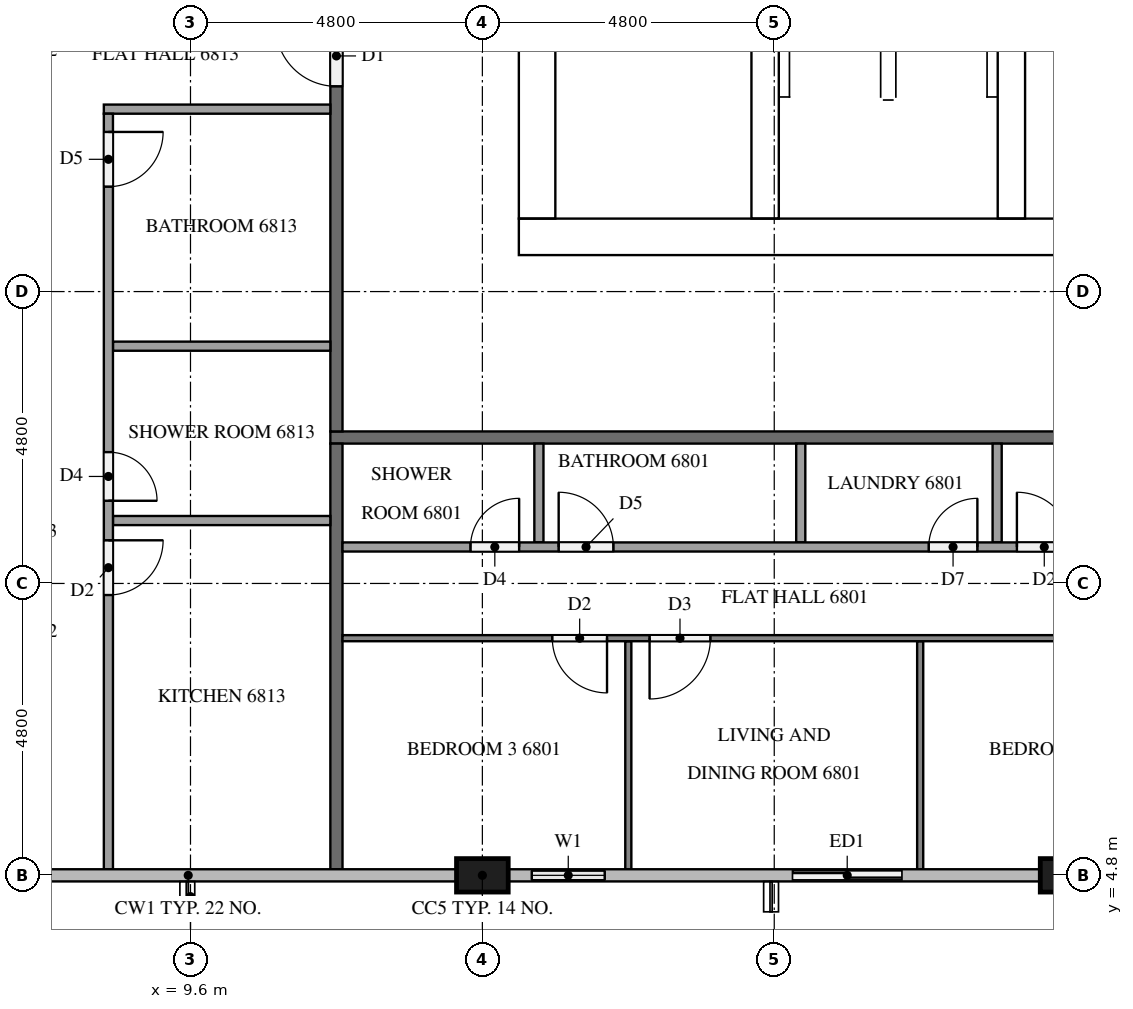
"""IFC4 building model, lengths in metres.
Left out: names, types, materials, properties, quantities, classifications, styles, units other than length and angle.
Written with IfcOpenShell. Run it as: python <this file> out.ifc"""

import sys

from ifc_helpers import new_model, si_unit, direction, frame, frame_2d, origin, origin_2d, place, context, subcontext, project, spatial, rectangle, extrude, element, fill, save


model = new_model("IFC4")
c1 = context("Model", 3, precision=1e-05, world=origin(), true_north=direction((0.0, 1.0)))
c2 = subcontext(c1, "Body", "Model", "MODEL_VIEW")
j1 = project(units=[si_unit("LENGTHUNIT", "METRE"), si_unit("PLANEANGLEUNIT", "RADIAN")], contexts=[c1])
p1 = place(None, origin())
s1 = spatial("IfcSite", under=j1, at=p1, CompositionType="ELEMENT")
p2 = place(p1, origin())
s2 = spatial("IfcBuilding", under=s1, at=p2, CompositionType="ELEMENT")
p3 = place(p2, frame((0.0, 0.0, 259.7)))
s3 = spatial("IfcBuildingStorey", under=s2, at=p3, CompositionType="ELEMENT", Elevation=259.7)
p4 = place(p3, frame((15.0, 15.3, 0.0), z_axis=(0.0, 0.0, 1.0), x_axis=(1.0, 0.0, 0.0)))
e1 = element("IfcWall", 1, at=p4, inside=s3, PredefinedType="SHEAR", context=c2, shape_type="SweptSolid", body=[
    extrude(rectangle(XDim=32.4, YDim=0.6, at=frame_2d((16.2, 0.0))), origin(), (0.0, 0.0, 1.0), 3.1),
])
p5 = place(p4, frame((15.3, 0.0, 0.0)))
e2 = element("IfcOpeningElement", 2, at=p5, cuts=e1, PredefinedType="OPENING", context=c2, shape_type="SweptSolid", body=[
    extrude(rectangle(XDim=1.8, YDim=2.1, at=frame_2d((0.9, 1.05))), frame((0.0, 0.31, 0.0), z_axis=(0.0, -1.0, 0.0), x_axis=(1.0, 0.0, 0.0)), (0.0, 0.0, 1.0), 0.62),
])
p6 = place(p3, frame((15.3, 15.6, 0.0), z_axis=(0.0, 0.0, 1.0), x_axis=(0.0, 1.0, 0.0)))
e3 = element("IfcWall", 3, at=p6, inside=s3, PredefinedType="SHEAR", context=c2, shape_type="SweptSolid", body=[
    extrude(rectangle(XDim=21.6, YDim=0.6, at=frame_2d((10.8, 0.0))), origin(), (0.0, 0.0, 1.0), 3.1),
])
p7 = place(p6, frame((5.16, 0.0, 0.0)))
e4 = element("IfcOpeningElement", 4, at=p7, cuts=e3, PredefinedType="OPENING", context=c2, shape_type="SweptSolid", body=[
    extrude(rectangle(XDim=1.2, YDim=2.1, at=frame_2d((0.6, 1.05))), frame((0.0, 0.31, 0.0), z_axis=(0.0, -1.0, 0.0), x_axis=(1.0, 0.0, 0.0)), (0.0, 0.0, 1.0), 0.62),
])
p8 = place(p3, frame((19.05, 15.6, 0.0), z_axis=(0.0, 0.0, 1.0), x_axis=(0.0, 1.0, 0.0)))
e5 = element("IfcWall", 5, at=p8, inside=s3, PredefinedType="SHEAR", context=c2, shape_type="SweptSolid", body=[
    extrude(rectangle(XDim=15.425, YDim=0.45, at=frame_2d((7.712, 0.0))), origin(), (0.0, 0.0, 1.0), 3.1),
])
p9 = place(p8, frame((9.85, 0.0, 0.0)))
e6 = element("IfcOpeningElement", 6, at=p9, cuts=e5, PredefinedType="OPENING", context=c2, shape_type="SweptSolid", body=[
    extrude(rectangle(XDim=1.1, YDim=2.1, at=frame_2d((0.55, 1.05))), frame((0.0, 0.235, 0.0), z_axis=(0.0, -1.0, 0.0), x_axis=(1.0, 0.0, 0.0)), (0.0, 0.0, 1.0), 0.47),
])
p10 = place(p8, frame((13.35, 0.0, 0.0)))
e7 = element("IfcOpeningElement", 7, at=p10, cuts=e5, PredefinedType="OPENING", context=c2, shape_type="SweptSolid", body=[
    extrude(rectangle(XDim=1.1, YDim=2.1, at=frame_2d((0.55, 1.05))), frame((0.0, 0.235, 0.0), z_axis=(0.0, -1.0, 0.0), x_axis=(1.0, 0.0, 0.0)), (0.0, 0.0, 1.0), 0.47),
])
p11 = place(p8, frame((0.6, 0.0, 0.0)))
e8 = element("IfcOpeningElement", 8, at=p11, cuts=e5, PredefinedType="OPENING", context=c2, shape_type="SweptSolid", body=[
    extrude(rectangle(XDim=1.2, YDim=2.1, at=frame_2d((0.6, 1.05))), frame((0.0, 0.235, 0.0), z_axis=(0.0, -1.0, 0.0), x_axis=(1.0, 0.0, 0.0)), (0.0, 0.0, 1.0), 0.47),
])
p12 = place(p3, frame((23.1, 15.6, 0.0), z_axis=(0.0, 0.0, 1.0), x_axis=(0.0, 1.0, 0.0)))
e9 = element("IfcWall", 9, at=p12, inside=s3, PredefinedType="SHEAR", context=c2, shape_type="SweptSolid", body=[
    extrude(rectangle(XDim=21.6, YDim=0.45, at=frame_2d((10.8, 0.0))), origin(), (0.0, 0.0, 1.0), 3.1),
])
for number, where, z_axis, x_axis in (
    (10, (14.4, 4.8, 0.0), (0.0, 0.0, 1.0), (1.0, 0.0, 0.0)),
    (11, (24.0, 4.8, 0.0), (0.0, 0.0, 1.0), (1.0, 0.0, 0.0)),
):
    element("IfcColumn", number, at=place(p3, frame(where, z_axis=z_axis, x_axis=x_axis)), inside=s3, PredefinedType="COLUMN", context=c2, shape_type="SweptSolid", body=[
        extrude(rectangle(XDim=0.85, YDim=0.55, at=origin_2d()), origin(), (0.0, 0.0, 1.0), 3.1),
    ])
p13 = place(p3, frame((14.825, 4.8, 0.0), z_axis=(0.0, 0.0, 1.0), x_axis=(1.0, 0.0, 0.0)))
e12 = element("IfcWall", 12, at=p13, inside=s3, PredefinedType="SOLIDWALL", context=c2, shape_type="SweptSolid", body=[
    extrude(rectangle(XDim=1.975, YDim=0.15, at=frame_2d((0.988, 0.0))), origin(), (0.0, 0.0, 1.0), 3.1),
])
p14 = place(p13, frame((0.387, 0.0, 0.9)))
e13 = element("IfcOpeningElement", 13, at=p14, cuts=e12, PredefinedType="OPENING", context=c2, shape_type="SweptSolid", body=[
    extrude(rectangle(XDim=1.2, YDim=1.4, at=frame_2d((0.6, 0.7))), frame((0.0, 0.085, 0.0), z_axis=(0.0, -1.0, 0.0), x_axis=(1.0, 0.0, 0.0)), (0.0, 0.0, 1.0), 0.17),
])
p15 = place(p3, frame((19.2, 4.8, 0.0), z_axis=(0.0, 0.0, 1.0), x_axis=(1.0, 0.0, 0.0)))
e14 = element("IfcWall", 14, at=p15, inside=s3, PredefinedType="SOLIDWALL", context=c2, shape_type="SweptSolid", body=[
    extrude(rectangle(XDim=2.4, YDim=0.15, at=frame_2d((1.2, 0.0))), origin(), (0.0, 0.0, 1.0), 3.1),
])
p16 = place(p15, frame((0.3, 0.0, 0.0)))
e15 = element("IfcOpeningElement", 15, at=p16, cuts=e14, PredefinedType="OPENING", context=c2, shape_type="SweptSolid", body=[
    extrude(rectangle(XDim=1.8, YDim=2.4, at=frame_2d((0.9, 1.2))), frame((0.0, 0.085, 0.0), z_axis=(0.0, -1.0, 0.0), x_axis=(1.0, 0.0, 0.0)), (0.0, 0.0, 1.0), 0.17),
])
p17 = place(p3, frame((50.5, 12.0, 0.0), z_axis=(0.0, 0.0, 1.0), x_axis=(-1.0, 0.0, 0.0)))
e16 = element("IfcWall", 16, at=p17, inside=s3, PredefinedType="PARTITIONING", context=c2, shape_type="SweptSolid", body=[
    extrude(rectangle(XDim=38.6, YDim=0.2, at=frame_2d((19.3, 0.0))), origin(), (0.0, 0.0, 1.0), 3.1),
])
p18 = place(p17, frame((19.675, 0.0, 0.0)))
e17 = element("IfcOpeningElement", 17, at=p18, cuts=e16, PredefinedType="OPENING", context=c2, shape_type="SweptSolid", body=[
    extrude(rectangle(XDim=1.1, YDim=2.1, at=frame_2d((0.55, 1.05))), frame((0.0, 0.11, 0.0), z_axis=(0.0, -1.0, 0.0), x_axis=(1.0, 0.0, 0.0)), (0.0, 0.0, 1.0), 0.22),
])
p19 = place(p17, frame((2.925, 0.0, 0.0)))
e18 = element("IfcOpeningElement", 18, at=p19, cuts=e16, PredefinedType="OPENING", context=c2, shape_type="SweptSolid", body=[
    extrude(rectangle(XDim=1.0, YDim=2.1, at=frame_2d((0.5, 1.05))), frame((0.0, 0.11, 0.0), z_axis=(0.0, -1.0, 0.0), x_axis=(1.0, 0.0, 0.0)), (0.0, 0.0, 1.0), 0.22),
])
p20 = place(p17, frame((1.075, 0.0, 0.0)))
e19 = element("IfcOpeningElement", 19, at=p20, cuts=e16, PredefinedType="OPENING", context=c2, shape_type="SweptSolid", body=[
    extrude(rectangle(XDim=1.0, YDim=2.1, at=frame_2d((0.5, 1.05))), frame((0.0, 0.11, 0.0), z_axis=(0.0, -1.0, 0.0), x_axis=(1.0, 0.0, 0.0)), (0.0, 0.0, 1.0), 0.22),
])
p21 = place(p3, frame((12.0, 12.1, 0.0), z_axis=(0.0, 0.0, 1.0), x_axis=(0.0, 1.0, 0.0)))
e20 = element("IfcWall", 20, at=p21, inside=s3, PredefinedType="PARTITIONING", context=c2, shape_type="SweptSolid", body=[
    extrude(rectangle(XDim=28.6, YDim=0.2, at=frame_2d((14.3, 0.0))), origin(), (0.0, 0.0, 1.0), 3.1),
])
p22 = place(p21, frame((21.875, 0.0, 0.0)))
e21 = element("IfcOpeningElement", 21, at=p22, cuts=e20, PredefinedType="OPENING", context=c2, shape_type="SweptSolid", body=[
    extrude(rectangle(XDim=1.1, YDim=2.1, at=frame_2d((0.55, 1.05))), frame((0.0, 0.11, 0.0), z_axis=(0.0, -1.0, 0.0), x_axis=(1.0, 0.0, 0.0)), (0.0, 0.0, 1.0), 0.22),
])
p23 = place(p21, frame((20.075, 0.0, 0.0)))
e22 = element("IfcOpeningElement", 22, at=p23, cuts=e20, PredefinedType="OPENING", context=c2, shape_type="SweptSolid", body=[
    extrude(rectangle(XDim=1.0, YDim=2.1, at=frame_2d((0.5, 1.05))), frame((0.0, 0.11, 0.0), z_axis=(0.0, -1.0, 0.0), x_axis=(1.0, 0.0, 0.0)), (0.0, 0.0, 1.0), 0.22),
])
p24 = place(p21, frame((5.675, 0.0, 0.0)))
e23 = element("IfcOpeningElement", 23, at=p24, cuts=e20, PredefinedType="OPENING", context=c2, shape_type="SweptSolid", body=[
    extrude(rectangle(XDim=1.0, YDim=2.1, at=frame_2d((0.5, 1.05))), frame((0.0, 0.11, 0.0), z_axis=(0.0, -1.0, 0.0), x_axis=(1.0, 0.0, 0.0)), (0.0, 0.0, 1.0), 0.22),
])
p25 = place(p3, frame((12.0, 4.9, 0.0), z_axis=(0.0, 0.0, 1.0), x_axis=(0.0, 1.0, 0.0)))
e24 = element("IfcWall", 24, at=p25, inside=s3, PredefinedType="PARTITIONING", context=c2, shape_type="SweptSolid", body=[
    extrude(rectangle(XDim=7.0, YDim=0.2, at=frame_2d((3.5, 0.0))), origin(), (0.0, 0.0, 1.0), 3.1),
])
for number, where, z_axis, x_axis in (
    (25, (21.6, 8.65, 0.0), (0.0, 0.0, 1.0), (0.0, -1.0, 0.0)),
    (26, (16.8, 8.65, 0.0), (0.0, 0.0, 1.0), (0.0, -1.0, 0.0)),
):
    element("IfcWall", number, at=place(p3, frame(where, z_axis=z_axis, x_axis=x_axis)), inside=s3, PredefinedType="PARTITIONING", context=c2, shape_type="SweptSolid", body=[
        extrude(rectangle(XDim=3.75, YDim=0.1, at=frame_2d((1.875, 0.0))), origin(), (0.0, 0.0, 1.0), 3.1),
    ])
p26 = place(p3, frame((31.1, 8.7, 0.0), z_axis=(0.0, 0.0, 1.0), x_axis=(-1.0, 0.0, 0.0)))
e27 = element("IfcWall", 27, at=p26, inside=s3, PredefinedType="PARTITIONING", context=c2, shape_type="SweptSolid", body=[
    extrude(rectangle(XDim=19.0, YDim=0.1, at=frame_2d((9.5, 0.0))), origin(), (0.0, 0.0, 1.0), 3.1),
])
p27 = place(p26, frame((3.45, 0.0, 0.0)))
e28 = element("IfcOpeningElement", 28, at=p27, cuts=e27, PredefinedType="OPENING", context=c2, shape_type="SweptSolid", body=[
    extrude(rectangle(XDim=0.9, YDim=2.1, at=frame_2d((0.45, 1.05))), frame((0.0, 0.06, 0.0), z_axis=(0.0, -1.0, 0.0), x_axis=(1.0, 0.0, 0.0)), (0.0, 0.0, 1.0), 0.12),
])
p28 = place(p26, frame((5.05, 0.0, 0.0)))
e29 = element("IfcOpeningElement", 29, at=p28, cuts=e27, PredefinedType="OPENING", context=c2, shape_type="SweptSolid", body=[
    extrude(rectangle(XDim=0.9, YDim=2.1, at=frame_2d((0.45, 1.05))), frame((0.0, 0.06, 0.0), z_axis=(0.0, -1.0, 0.0), x_axis=(1.0, 0.0, 0.0)), (0.0, 0.0, 1.0), 0.12),
])
p29 = place(p26, frame((12.95, 0.0, 0.0)))
e30 = element("IfcOpeningElement", 30, at=p29, cuts=e27, PredefinedType="OPENING", context=c2, shape_type="SweptSolid", body=[
    extrude(rectangle(XDim=1.0, YDim=2.1, at=frame_2d((0.5, 1.05))), frame((0.0, 0.06, 0.0), z_axis=(0.0, -1.0, 0.0), x_axis=(1.0, 0.0, 0.0)), (0.0, 0.0, 1.0), 0.12),
])
p30 = place(p26, frame((14.65, 0.0, 0.0)))
e31 = element("IfcOpeningElement", 31, at=p30, cuts=e27, PredefinedType="OPENING", context=c2, shape_type="SweptSolid", body=[
    extrude(rectangle(XDim=0.9, YDim=2.1, at=frame_2d((0.45, 1.05))), frame((0.0, 0.06, 0.0), z_axis=(0.0, -1.0, 0.0), x_axis=(1.0, 0.0, 0.0)), (0.0, 0.0, 1.0), 0.12),
])
for number, where, z_axis, x_axis in (
    (32, (22.865, 11.9, 0.0), (0.0, 0.0, 1.0), (0.0, -1.0, 0.0)),
    (33, (19.636, 11.9, 0.0), (0.0, 0.0, 1.0), (0.0, -1.0, 0.0)),
    (34, (15.33, 11.9, 0.0), (0.0, 0.0, 1.0), (0.0, -1.0, 0.0)),
):
    element("IfcWall", number, at=place(p3, frame(where, z_axis=z_axis, x_axis=x_axis)), inside=s3, PredefinedType="PARTITIONING", context=c2, shape_type="SweptSolid", body=[
        extrude(rectangle(XDim=1.625, YDim=0.15, at=frame_2d((0.812, 0.0))), origin(), (0.0, 0.0, 1.0), 3.1),
    ])
p31 = place(p3, frame((12.1, 10.2, 0.0), z_axis=(0.0, 0.0, 1.0), x_axis=(1.0, 0.0, 0.0)))
e35 = element("IfcWall", 35, at=p31, inside=s3, PredefinedType="PARTITIONING", context=c2, shape_type="SweptSolid", body=[
    extrude(rectangle(XDim=17.225, YDim=0.15, at=frame_2d((8.612, 0.0))), origin(), (0.0, 0.0, 1.0), 3.1),
])
p32 = place(p31, frame((11.091, 0.0, 0.0)))
e36 = element("IfcOpeningElement", 36, at=p32, cuts=e35, PredefinedType="OPENING", context=c2, shape_type="SweptSolid", body=[
    extrude(rectangle(XDim=0.9, YDim=2.1, at=frame_2d((0.45, 1.05))), frame((0.0, 0.085, 0.0), z_axis=(0.0, -1.0, 0.0), x_axis=(1.0, 0.0, 0.0)), (0.0, 0.0, 1.0), 0.17),
])
p33 = place(p31, frame((9.641, 0.0, 0.0)))
e37 = element("IfcOpeningElement", 37, at=p33, cuts=e35, PredefinedType="OPENING", context=c2, shape_type="SweptSolid", body=[
    extrude(rectangle(XDim=0.8, YDim=2.1, at=frame_2d((0.4, 1.05))), frame((0.0, 0.085, 0.0), z_axis=(0.0, -1.0, 0.0), x_axis=(1.0, 0.0, 0.0)), (0.0, 0.0, 1.0), 0.17),
])
p34 = place(p31, frame((3.555, 0.0, 0.0)))
e38 = element("IfcOpeningElement", 38, at=p34, cuts=e35, PredefinedType="OPENING", context=c2, shape_type="SweptSolid", body=[
    extrude(rectangle(XDim=0.9, YDim=2.1, at=frame_2d((0.45, 1.05))), frame((0.0, 0.085, 0.0), z_axis=(0.0, -1.0, 0.0), x_axis=(1.0, 0.0, 0.0)), (0.0, 0.0, 1.0), 0.17),
])
p35 = place(p31, frame((2.105, 0.0, 0.0)))
e39 = element("IfcOpeningElement", 39, at=p35, cuts=e35, PredefinedType="OPENING", context=c2, shape_type="SweptSolid", body=[
    extrude(rectangle(XDim=0.8, YDim=2.1, at=frame_2d((0.4, 1.05))), frame((0.0, 0.085, 0.0), z_axis=(0.0, -1.0, 0.0), x_axis=(1.0, 0.0, 0.0)), (0.0, 0.0, 1.0), 0.17),
])
for number, where, z_axis, x_axis in (
    (40, (11.9, 13.502, 0.0), (0.0, 0.0, 1.0), (-1.0, 0.0, 0.0)),
    (41, (11.9, 10.635, 0.0), (0.0, 0.0, 1.0), (-1.0, 0.0, 0.0)),
):
    element("IfcWall", number, at=place(p3, frame(where, z_axis=z_axis, x_axis=x_axis)), inside=s3, PredefinedType="PARTITIONING", context=c2, shape_type="SweptSolid", body=[
        extrude(rectangle(XDim=3.575, YDim=0.15, at=frame_2d((1.788, 0.0))), origin(), (0.0, 0.0, 1.0), 3.1),
    ])
p36 = place(p3, frame((11.9, 17.4, 0.0), z_axis=(0.0, 0.0, 1.0), x_axis=(-1.0, 0.0, 0.0)))
e42 = element("IfcWall", 42, at=p36, inside=s3, PredefinedType="PARTITIONING", context=c2, shape_type="SweptSolid", body=[
    extrude(rectangle(XDim=3.725, YDim=0.15, at=frame_2d((1.862, 0.0))), origin(), (0.0, 0.0, 1.0), 3.1),
])
p37 = place(p3, frame((8.25, 17.325, 0.0), z_axis=(0.0, 0.0, 1.0), x_axis=(0.0, -1.0, 0.0)))
e43 = element("IfcWall", 43, at=p37, inside=s3, PredefinedType="PARTITIONING", context=c2, shape_type="SweptSolid", body=[
    extrude(rectangle(XDim=12.425, YDim=0.15, at=frame_2d((6.212, 0.0))), origin(), (0.0, 0.0, 1.0), 3.1),
])
p38 = place(p37, frame((0.3, 0.0, 0.0)))
e44 = element("IfcOpeningElement", 44, at=p38, cuts=e43, PredefinedType="OPENING", context=c2, shape_type="SweptSolid", body=[
    extrude(rectangle(XDim=0.9, YDim=2.1, at=frame_2d((0.45, 1.05))), frame((0.0, 0.085, 0.0), z_axis=(0.0, -1.0, 0.0), x_axis=(1.0, 0.0, 0.0)), (0.0, 0.0, 1.0), 0.17),
])
p39 = place(p37, frame((5.565, 0.0, 0.0)))
e45 = element("IfcOpeningElement", 45, at=p39, cuts=e43, PredefinedType="OPENING", context=c2, shape_type="SweptSolid", body=[
    extrude(rectangle(XDim=0.8, YDim=2.1, at=frame_2d((0.4, 1.05))), frame((0.0, 0.085, 0.0), z_axis=(0.0, -1.0, 0.0), x_axis=(1.0, 0.0, 0.0)), (0.0, 0.0, 1.0), 0.17),
])
p40 = place(p37, frame((7.015, 0.0, 0.0)))
e46 = element("IfcOpeningElement", 46, at=p40, cuts=e43, PredefinedType="OPENING", context=c2, shape_type="SweptSolid", body=[
    extrude(rectangle(XDim=0.9, YDim=2.1, at=frame_2d((0.45, 1.05))), frame((0.0, 0.085, 0.0), z_axis=(0.0, -1.0, 0.0), x_axis=(1.0, 0.0, 0.0)), (0.0, 0.0, 1.0), 0.17),
])
p41 = place(p14, origin())
e47 = element("IfcWindow", 47, at=p41, inside=s3, PartitioningType="SINGLE_PANEL", PredefinedType="WINDOW", context=c2, shape_type="SweptSolid", body=[
    extrude(rectangle(XDim=1.2, YDim=1.4, at=frame_2d((0.6, 0.7))), frame((0.0, 0.03, 0.0), z_axis=(0.0, -1.0, 0.0), x_axis=(1.0, 0.0, 0.0)), (0.0, 0.0, 1.0), 0.06),
])
fill(e13, e47)
p42 = place(p16, origin())
e48 = element("IfcDoor", 48, at=p42, inside=s3, OperationType="SLIDING_TO_LEFT", PredefinedType="DOOR", context=c2, shape_type="SweptSolid", body=[
    extrude(rectangle(XDim=1.8, YDim=2.4, at=frame_2d((0.9, 1.2))), frame((0.0, 0.025, 0.0), z_axis=(0.0, -1.0, 0.0), x_axis=(1.0, 0.0, 0.0)), (0.0, 0.0, 1.0), 0.05),
])
fill(e15, e48)
p43 = place(p11, frame((1.2, 0.0, 0.0), z_axis=(0.0, 0.0, 1.0), x_axis=(-1.0, 0.0, 0.0)))
e49 = element("IfcDoor", 49, at=p43, inside=s3, OperationType="SINGLE_SWING_RIGHT", PredefinedType="DOOR", context=c2, shape_type="SweptSolid", body=[
    extrude(rectangle(XDim=1.2, YDim=2.1, at=frame_2d((0.6, 1.05))), frame((0.0, 0.025, 0.0), z_axis=(0.0, -1.0, 0.0), x_axis=(1.0, 0.0, 0.0)), (0.0, 0.0, 1.0), 0.05),
])
fill(e8, e49)
p44 = place(p24, origin())
e50 = element("IfcDoor", 50, at=p44, inside=s3, OperationType="SINGLE_SWING_RIGHT", PredefinedType="DOOR", context=c2, shape_type="SweptSolid", body=[
    extrude(rectangle(XDim=1.0, YDim=2.1, at=frame_2d((0.5, 1.05))), frame((0.0, 0.025, 0.0), z_axis=(0.0, -1.0, 0.0), x_axis=(1.0, 0.0, 0.0)), (0.0, 0.0, 1.0), 0.05),
])
fill(e23, e50)
p45 = place(p29, origin())
e51 = element("IfcDoor", 51, at=p45, inside=s3, OperationType="SINGLE_SWING_RIGHT", PredefinedType="DOOR", context=c2, shape_type="SweptSolid", body=[
    extrude(rectangle(XDim=1.0, YDim=2.1, at=frame_2d((0.5, 1.05))), frame((0.0, 0.025, 0.0), z_axis=(0.0, -1.0, 0.0), x_axis=(1.0, 0.0, 0.0)), (0.0, 0.0, 1.0), 0.05),
])
fill(e30, e51)
p46 = place(p30, origin())
e52 = element("IfcDoor", 52, at=p46, inside=s3, OperationType="SINGLE_SWING_LEFT", PredefinedType="DOOR", context=c2, shape_type="SweptSolid", body=[
    extrude(rectangle(XDim=0.9, YDim=2.1, at=frame_2d((0.45, 1.05))), frame((0.0, 0.025, 0.0), z_axis=(0.0, -1.0, 0.0), x_axis=(1.0, 0.0, 0.0)), (0.0, 0.0, 1.0), 0.05),
])
fill(e31, e52)
p47 = place(p32, origin())
e53 = element("IfcDoor", 53, at=p47, inside=s3, OperationType="SINGLE_SWING_LEFT", PredefinedType="DOOR", context=c2, shape_type="SweptSolid", body=[
    extrude(rectangle(XDim=0.9, YDim=2.1, at=frame_2d((0.45, 1.05))), frame((0.0, 0.025, 0.0), z_axis=(0.0, -1.0, 0.0), x_axis=(1.0, 0.0, 0.0)), (0.0, 0.0, 1.0), 0.05),
])
fill(e36, e53)
p48 = place(p33, origin())
e54 = element("IfcDoor", 54, at=p48, inside=s3, OperationType="SINGLE_SWING_RIGHT", PredefinedType="DOOR", context=c2, shape_type="SweptSolid", body=[
    extrude(rectangle(XDim=0.8, YDim=2.1, at=frame_2d((0.4, 1.05))), frame((0.0, 0.025, 0.0), z_axis=(0.0, -1.0, 0.0), x_axis=(1.0, 0.0, 0.0)), (0.0, 0.0, 1.0), 0.05),
])
fill(e37, e54)
p49 = place(p34, origin())
e55 = element("IfcDoor", 55, at=p49, inside=s3, OperationType="SINGLE_SWING_LEFT", PredefinedType="DOOR", context=c2, shape_type="SweptSolid", body=[
    extrude(rectangle(XDim=0.9, YDim=2.1, at=frame_2d((0.45, 1.05))), frame((0.0, 0.025, 0.0), z_axis=(0.0, -1.0, 0.0), x_axis=(1.0, 0.0, 0.0)), (0.0, 0.0, 1.0), 0.05),
])
fill(e38, e55)
p50 = place(p35, origin())
e56 = element("IfcDoor", 56, at=p50, inside=s3, OperationType="SINGLE_SWING_RIGHT", PredefinedType="DOOR", context=c2, shape_type="SweptSolid", body=[
    extrude(rectangle(XDim=0.8, YDim=2.1, at=frame_2d((0.4, 1.05))), frame((0.0, 0.025, 0.0), z_axis=(0.0, -1.0, 0.0), x_axis=(1.0, 0.0, 0.0)), (0.0, 0.0, 1.0), 0.05),
])
fill(e39, e56)
p51 = place(p38, origin())
e57 = element("IfcDoor", 57, at=p51, inside=s3, OperationType="SINGLE_SWING_LEFT", PredefinedType="DOOR", context=c2, shape_type="SweptSolid", body=[
    extrude(rectangle(XDim=0.9, YDim=2.1, at=frame_2d((0.45, 1.05))), frame((0.0, 0.025, 0.0), z_axis=(0.0, -1.0, 0.0), x_axis=(1.0, 0.0, 0.0)), (0.0, 0.0, 1.0), 0.05),
])
fill(e44, e57)
p52 = place(p39, origin())
e58 = element("IfcDoor", 58, at=p52, inside=s3, OperationType="SINGLE_SWING_RIGHT", PredefinedType="DOOR", context=c2, shape_type="SweptSolid", body=[
    extrude(rectangle(XDim=0.8, YDim=2.1, at=frame_2d((0.4, 1.05))), frame((0.0, 0.025, 0.0), z_axis=(0.0, -1.0, 0.0), x_axis=(1.0, 0.0, 0.0)), (0.0, 0.0, 1.0), 0.05),
])
fill(e45, e58)
p53 = place(p40, origin())
e59 = element("IfcDoor", 59, at=p53, inside=s3, OperationType="SINGLE_SWING_LEFT", PredefinedType="DOOR", context=c2, shape_type="SweptSolid", body=[
    extrude(rectangle(XDim=0.9, YDim=2.1, at=frame_2d((0.45, 1.05))), frame((0.0, 0.025, 0.0), z_axis=(0.0, -1.0, 0.0), x_axis=(1.0, 0.0, 0.0)), (0.0, 0.0, 1.0), 0.05),
])
fill(e46, e59)
save(model, sys.argv[1])
